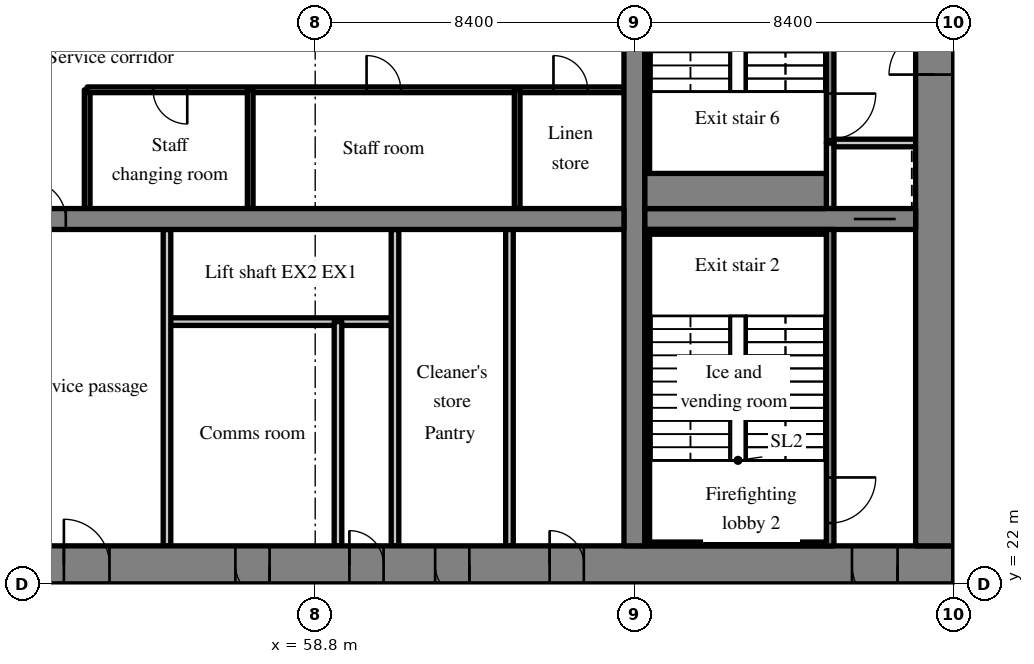
"""IFC4 building model, lengths in metres.
Left out: names, types, materials, properties, quantities, classifications, styles, units other than length and angle.
Written with IfcOpenShell. Run it as: python <this file> out.ifc"""

import sys

from ifc_helpers import new_model, si_unit, direction, frame, frame_2d, origin, place, context, subcontext, project, spatial, rectangle, extrude, source, transform, mapped, element, fill, save


model = new_model("IFC4")
c1 = context("Model", 3, precision=1e-05, world=origin(), true_north=direction((0.0, 1.0)))
c2 = subcontext(c1, "Body", "Model", "MODEL_VIEW")
j1 = project(units=[si_unit("LENGTHUNIT", "METRE"), si_unit("PLANEANGLEUNIT", "RADIAN")], contexts=[c1])
p1 = place(None, origin())
s1 = spatial("IfcSite", under=j1, at=p1, CompositionType="ELEMENT")
p2 = place(p1, origin())
s2 = spatial("IfcBuilding", under=s1, at=p2, CompositionType="ELEMENT")
p3 = place(p2, frame((0.0, 0.0, 65.8)))
s3 = spatial("IfcBuildingStorey", under=s2, at=p3, CompositionType="ELEMENT", Elevation=65.8)
m1 = source(origin(), c2, "Body", "SweptSolid", [
    extrude(rectangle(XDim=50.4, YDim=1.0, at=frame_2d((25.2, 0.0))), origin(), (0.0, 0.0, 1.0), 3.52),
])
p4 = place(p3, frame((25.2, 22.5, 0.0), z_axis=(0.0, 0.0, 1.0), x_axis=(1.0, 0.0, 0.0)))
e1 = element("IfcWall", 1, at=p4, inside=s3, PredefinedType="SHEAR", context=c2, shape_type="MappedRepresentation", body=[
    mapped(m1, transform((0.0, 0.0, 0.0), scale=1.0)),
])
m2 = source(origin(), c2, "Body", "SweptSolid", [
    extrude(rectangle(XDim=1.8, YDim=2.1, at=frame_2d((0.9, 1.05))), frame((0.0, 0.51, 0.0), z_axis=(0.0, -1.0, 0.0), x_axis=(1.0, 0.0, 0.0)), (0.0, 0.0, 1.0), 1.02),
])
p5 = place(p4, frame((15.9, 0.0, 0.0)))
e2 = element("IfcOpeningElement", 2, at=p5, cuts=e1, PredefinedType="OPENING", context=c2, shape_type="MappedRepresentation", body=[
    mapped(m2, transform((0.0, 0.0, 0.0), scale=1.0)),
])
m3 = source(origin(), c2, "Body", "SweptSolid", [
    extrude(rectangle(XDim=1.2, YDim=2.1, at=frame_2d((0.6, 1.05))), frame((0.0, 0.51, 0.0), z_axis=(0.0, -1.0, 0.0), x_axis=(1.0, 0.0, 0.0)), (0.0, 0.0, 1.0), 1.02),
])
p6 = place(p4, frame((26.987, 0.0, 0.0)))
e3 = element("IfcOpeningElement", 3, at=p6, cuts=e1, PredefinedType="OPENING", context=c2, shape_type="MappedRepresentation", body=[
    mapped(m3, transform((0.0, 0.0, 0.0), scale=1.0)),
])
m4 = source(origin(), c2, "Body", "SweptSolid", [
    extrude(rectangle(XDim=0.9, YDim=2.1, at=frame_2d((0.45, 1.05))), frame((0.0, 0.51, 0.0), z_axis=(0.0, -1.0, 0.0), x_axis=(1.0, 0.0, 0.0)), (0.0, 0.0, 1.0), 1.02),
])
p7 = place(p4, frame((34.5, 0.0, 0.0)))
e4 = element("IfcOpeningElement", 4, at=p7, cuts=e1, PredefinedType="OPENING", context=c2, shape_type="MappedRepresentation", body=[
    mapped(m4, transform((0.0, 0.0, 0.0), scale=1.0)),
])
p8 = place(p4, frame((31.5, 0.0, 0.0)))
e5 = element("IfcOpeningElement", 5, at=p8, cuts=e1, PredefinedType="OPENING", context=c2, shape_type="MappedRepresentation", body=[
    mapped(m4, transform((0.0, 0.0, 0.0), scale=1.0)),
])
p9 = place(p4, frame((39.769, 0.0, 0.0)))
e6 = element("IfcOpeningElement", 6, at=p9, cuts=e1, PredefinedType="OPENING", context=c2, shape_type="MappedRepresentation", body=[
    mapped(m4, transform((0.0, 0.0, 0.0), scale=1.0)),
])
p10 = place(p4, frame((36.756, 0.0, 0.0)))
e7 = element("IfcOpeningElement", 7, at=p10, cuts=e1, PredefinedType="OPENING", context=c2, shape_type="MappedRepresentation", body=[
    mapped(m4, transform((0.0, 0.0, 0.0), scale=1.0)),
])
p11 = place(p4, frame((6.438, 0.0, 0.0)))
e8 = element("IfcOpeningElement", 8, at=p11, cuts=e1, PredefinedType="OPENING", context=c2, shape_type="MappedRepresentation", body=[
    mapped(m3, transform((0.0, 0.0, 0.0), scale=1.0)),
])
p12 = place(p4, frame((47.725, 0.0, 0.0)))
e9 = element("IfcOpeningElement", 9, at=p12, cuts=e1, PredefinedType="OPENING", context=c2, shape_type="MappedRepresentation", body=[
    mapped(m3, transform((0.0, 0.0, 0.0), scale=1.0)),
])
m5 = source(origin(), c2, "Body", "SweptSolid", [
    extrude(rectangle(XDim=18.0, YDim=1.0, at=frame_2d((9.0, 0.0))), origin(), (0.0, 0.0, 1.0), 3.52),
])
p13 = place(p3, frame((75.1, 23.0, 0.0), z_axis=(0.0, 0.0, 1.0), x_axis=(0.0, 1.0, 0.0)))
e10 = element("IfcWall", 10, at=p13, inside=s3, PredefinedType="SHEAR", context=c2, shape_type="MappedRepresentation", body=[
    mapped(m5, transform((0.0, 0.0, 0.0), scale=1.0)),
])
p14 = place(p13, frame((12.4, 0.0, 0.0)))
e11 = element("IfcOpeningElement", 11, at=p14, cuts=e10, PredefinedType="OPENING", context=c2, shape_type="MappedRepresentation", body=[
    mapped(m3, transform((0.0, 0.0, 0.0), scale=1.0)),
])
m6 = source(origin(), c2, "Body", "SweptSolid", [
    extrude(rectangle(XDim=18.0, YDim=0.55, at=frame_2d((9.0, 0.0))), origin(), (0.0, 0.0, 1.0), 3.52),
])
p15 = place(p3, frame((67.2, 23.0, 0.0), z_axis=(0.0, 0.0, 1.0), x_axis=(0.0, 1.0, 0.0)))
e12 = element("IfcWall", 12, at=p15, inside=s3, PredefinedType="SHEAR", context=c2, shape_type="MappedRepresentation", body=[
    mapped(m6, transform((0.0, 0.0, 0.0), scale=1.0)),
])
m7 = source(origin(), c2, "Body", "SweptSolid", [
    extrude(rectangle(XDim=16.25, YDim=0.55, at=frame_2d((8.125, 0.0))), origin(), (0.0, 0.0, 1.0), 3.52),
])
p16 = place(p3, frame((50.675, 31.6, 0.0), z_axis=(0.0, 0.0, 1.0), x_axis=(1.0, 0.0, 0.0)))
e13 = element("IfcWall", 13, at=p16, inside=s3, PredefinedType="SHEAR", context=c2, shape_type="MappedRepresentation", body=[
    mapped(m7, transform((0.0, 0.0, 0.0), scale=1.0)),
])
m8 = source(origin(), c2, "Body", "SweptSolid", [
    extrude(rectangle(XDim=1.0, YDim=2.1, at=frame_2d((0.5, 1.05))), frame((0.0, 0.285, 0.0), z_axis=(0.0, -1.0, 0.0), x_axis=(1.0, 0.0, 0.0)), (0.0, 0.0, 1.0), 0.57),
])
p17 = place(p16, frame((0.562, 0.0, 0.0)))
e14 = element("IfcOpeningElement", 14, at=p17, cuts=e13, PredefinedType="OPENING", context=c2, shape_type="MappedRepresentation", body=[
    mapped(m8, transform((0.0, 0.0, 0.0), scale=1.0)),
])
m9 = source(origin(), c2, "Body", "SweptSolid", [
    extrude(rectangle(XDim=7.125, YDim=0.55, at=frame_2d((3.562, 0.0))), origin(), (0.0, 0.0, 1.0), 3.52),
])
p18 = place(p3, frame((67.475, 31.6, 0.0), z_axis=(0.0, 0.0, 1.0), x_axis=(1.0, 0.0, 0.0)))
e15 = element("IfcWall", 15, at=p18, inside=s3, PredefinedType="SHEAR", context=c2, shape_type="MappedRepresentation", body=[
    mapped(m9, transform((0.0, 0.0, 0.0), scale=1.0)),
])
m10 = source(origin(), c2, "Body", "SweptSolid", [
    extrude(rectangle(XDim=1.1, YDim=2.1, at=frame_2d((0.55, 1.05))), frame((0.0, 0.285, 0.0), z_axis=(0.0, -1.0, 0.0), x_axis=(1.0, 0.0, 0.0)), (0.0, 0.0, 1.0), 0.57),
])
p19 = place(p18, frame((5.5, 0.0, 0.0)))
e16 = element("IfcOpeningElement", 16, at=p19, cuts=e15, PredefinedType="OPENING", context=c2, shape_type="MappedRepresentation", body=[
    mapped(m10, transform((0.0, 0.0, 0.0), scale=1.0)),
])
m11 = source(origin(), c2, "Body", "SweptSolid", [
    extrude(rectangle(XDim=6.0, YDim=0.2, at=frame_2d((3.0, 0.0))), origin(), (0.0, 0.0, 1.0), 3.52),
])
p20 = place(p3, frame((60.9, 28.9, 0.0), z_axis=(0.0, 0.0, 1.0), x_axis=(-1.0, 0.0, 0.0)))
e17 = element("IfcWall", 17, at=p20, inside=s3, PredefinedType="SOLIDWALL", context=c2, shape_type="MappedRepresentation", body=[
    mapped(m11, transform((0.0, 0.0, 0.0), scale=1.0)),
])
m12 = source(origin(), c2, "Body", "SweptSolid", [
    extrude(rectangle(XDim=8.325, YDim=0.2, at=frame_2d((4.163, 0.0))), origin(), (0.0, 0.0, 1.0), 3.52),
])
for number, where, z_axis, x_axis in (
    (18, (54.9, 23.0, 0.0), (0.0, 0.0, 1.0), (0.0, 1.0, 0.0)),
    (19, (60.9, 23.0, 0.0), (0.0, 0.0, 1.0), (0.0, 1.0, 0.0)),
):
    element("IfcWall", number, at=place(p3, frame(where, z_axis=z_axis, x_axis=x_axis)), inside=s3, PredefinedType="PARTITIONING", context=c2, shape_type="MappedRepresentation", body=[
        mapped(m12, transform((0.0, 0.0, 0.0), scale=1.0)),
    ])
m13 = source(origin(), c2, "Body", "SweptSolid", [
    extrude(rectangle(XDim=5.9, YDim=0.2, at=frame_2d((2.95, 0.0))), origin(), (0.0, 0.0, 1.0), 3.52),
])
p21 = place(p3, frame((59.4, 23.0, 0.0), z_axis=(0.0, 0.0, 1.0), x_axis=(0.0, 1.0, 0.0)))
e20 = element("IfcWall", 20, at=p21, inside=s3, PredefinedType="PARTITIONING", context=c2, shape_type="MappedRepresentation", body=[
    mapped(m13, transform((0.0, 0.0, 0.0), scale=1.0)),
])
p22 = place(p3, frame((63.912, 23.0, 0.0), z_axis=(0.0, 0.0, 1.0), x_axis=(0.0, 1.0, 0.0)))
e21 = element("IfcWall", 21, at=p22, inside=s3, PredefinedType="PARTITIONING", context=c2, shape_type="MappedRepresentation", body=[
    mapped(m12, transform((0.0, 0.0, 0.0), scale=1.0)),
])
m14 = source(origin(), c2, "Body", "SweptSolid", [
    extrude(rectangle(XDim=3.125, YDim=0.15, at=frame_2d((1.562, 0.0))), origin(), (0.0, 0.0, 1.0), 3.52),
])
p23 = place(p3, frame((52.8, 31.875, 0.0), z_axis=(0.0, 0.0, 1.0), x_axis=(0.0, 1.0, 0.0)))
e22 = element("IfcWall", 22, at=p23, inside=s3, PredefinedType="PARTITIONING", context=c2, shape_type="MappedRepresentation", body=[
    mapped(m14, transform((0.0, 0.0, 0.0), scale=1.0)),
])
m15 = source(origin(), c2, "Body", "SweptSolid", [
    extrude(rectangle(XDim=14.125, YDim=0.15, at=frame_2d((7.062, 0.0))), origin(), (0.0, 0.0, 1.0), 3.52),
])
p24 = place(p3, frame((66.925, 35.0, 0.0), z_axis=(0.0, 0.0, 1.0), x_axis=(-1.0, 0.0, 0.0)))
e23 = element("IfcWall", 23, at=p24, inside=s3, PredefinedType="PARTITIONING", context=c2, shape_type="MappedRepresentation", body=[
    mapped(m15, transform((0.0, 0.0, 0.0), scale=1.0)),
])
m16 = source(origin(), c2, "Body", "SweptSolid", [
    extrude(rectangle(XDim=0.9, YDim=2.1, at=frame_2d((0.45, 1.05))), frame((0.0, 0.085, 0.0), z_axis=(0.0, -1.0, 0.0), x_axis=(1.0, 0.0, 0.0)), (0.0, 0.0, 1.0), 0.17),
])
p25 = place(p24, frame((0.955, 0.0, 0.0)))
e24 = element("IfcOpeningElement", 24, at=p25, cuts=e23, PredefinedType="OPENING", context=c2, shape_type="MappedRepresentation", body=[
    mapped(m16, transform((0.0, 0.0, 0.0), scale=1.0)),
])
p26 = place(p24, frame((5.873, 0.0, 0.0)))
e25 = element("IfcOpeningElement", 25, at=p26, cuts=e23, PredefinedType="OPENING", context=c2, shape_type="MappedRepresentation", body=[
    mapped(m16, transform((0.0, 0.0, 0.0), scale=1.0)),
])
p27 = place(p24, frame((11.492, 0.0, 0.0)))
e26 = element("IfcOpeningElement", 26, at=p27, cuts=e23, PredefinedType="OPENING", context=c2, shape_type="MappedRepresentation", body=[
    mapped(m16, transform((0.0, 0.0, 0.0), scale=1.0)),
])
for number, where, z_axis, x_axis in (
    (27, (64.115, 31.875, 0.0), (0.0, 0.0, 1.0), (0.0, 1.0, 0.0)),
    (28, (57.09, 31.875, 0.0), (0.0, 0.0, 1.0), (0.0, 1.0, 0.0)),
):
    element("IfcWall", number, at=place(p3, frame(where, z_axis=z_axis, x_axis=x_axis)), inside=s3, PredefinedType="PARTITIONING", context=c2, shape_type="MappedRepresentation", body=[
        mapped(m14, transform((0.0, 0.0, 0.0), scale=1.0)),
    ])
m17 = source(origin(), c2, "Body", "SweptSolid", [
    extrude(rectangle(XDim=8.325, YDim=0.2, at=frame_2d((4.163, 0.0))), origin(), (0.0, 0.0, 1.0), 3.52),
])
p28 = place(p3, frame((72.35, 23.0, 0.0), z_axis=(0.0, 0.0, 1.0), x_axis=(0.0, 1.0, 0.0)))
e29 = element("IfcWall", 29, at=p28, inside=s3, PredefinedType="SOLIDWALL", context=c2, shape_type="MappedRepresentation", body=[
    mapped(m17, transform((0.0, 0.0, 0.0), scale=1.0)),
])
m18 = source(origin(), c2, "Body", "SweptSolid", [
    extrude(rectangle(XDim=1.2, YDim=2.1, at=frame_2d((0.6, 1.05))), frame((0.0, 0.11, 0.0), z_axis=(0.0, -1.0, 0.0), x_axis=(1.0, 0.0, 0.0)), (0.0, 0.0, 1.0), 0.22),
])
p29 = place(p28, frame((0.6, 0.0, 0.0)))
e30 = element("IfcOpeningElement", 30, at=p29, cuts=e29, PredefinedType="OPENING", context=c2, shape_type="MappedRepresentation", body=[
    mapped(m18, transform((0.0, 0.0, 0.0), scale=1.0)),
])
m19 = source(origin(), c2, "Body", "SweptSolid", [
    extrude(rectangle(XDim=1.725, YDim=0.2, at=frame_2d((0.863, 0.0))), origin(), (0.0, 0.0, 1.0), 3.52),
])
p30 = place(p3, frame((72.35, 31.875, 0.0), z_axis=(0.0, 0.0, 1.0), x_axis=(0.0, 1.0, 0.0)))
e31 = element("IfcWall", 31, at=p30, inside=s3, PredefinedType="SOLIDWALL", context=c2, shape_type="MappedRepresentation", body=[
    mapped(m19, transform((0.0, 0.0, 0.0), scale=1.0)),
])
m20 = source(origin(), c2, "Body", "SweptSolid", [
    extrude(rectangle(XDim=2.15, YDim=0.2, at=frame_2d((1.075, 0.0))), origin(), (0.0, 0.0, 1.0), 3.52),
])
p31 = place(p3, frame((72.45, 33.6, 0.0), z_axis=(0.0, 0.0, 1.0), x_axis=(1.0, 0.0, 0.0)))
e32 = element("IfcWall", 32, at=p31, inside=s3, PredefinedType="SOLIDWALL", context=c2, shape_type="MappedRepresentation", body=[
    mapped(m20, transform((0.0, 0.0, 0.0), scale=1.0)),
])
m21 = source(origin(), c2, "Body", "SweptSolid", [
    extrude(rectangle(XDim=7.4, YDim=0.2, at=frame_2d((3.7, 0.0))), origin(), (0.0, 0.0, 1.0), 3.52),
])
p32 = place(p3, frame((72.35, 33.6, 0.0), z_axis=(0.0, 0.0, 1.0), x_axis=(0.0, 1.0, 0.0)))
e33 = element("IfcWall", 33, at=p32, inside=s3, PredefinedType="SOLIDWALL", context=c2, shape_type="MappedRepresentation", body=[
    mapped(m21, transform((0.0, 0.0, 0.0), scale=1.0)),
])
p33 = place(p32, frame((0.1, 0.0, 0.0)))
e34 = element("IfcOpeningElement", 34, at=p33, cuts=e33, PredefinedType="OPENING", context=c2, shape_type="MappedRepresentation", body=[
    mapped(m18, transform((0.0, 0.0, 0.0), scale=1.0)),
])
m22 = source(origin(), c2, "Body", "SweptSolid", [
    extrude(rectangle(XDim=8.2, YDim=0.2, at=frame_2d((4.1, 0.0))), origin(), (0.0, 0.0, 1.0), 3.52),
])
p34 = place(p3, frame((83.8, 22.1, 0.0), z_axis=(0.0, 0.0, 1.0), x_axis=(-1.0, 0.0, 0.0)))
e35 = element("IfcWall", 35, at=p34, inside=s3, PredefinedType="SOLIDWALL", context=c2, shape_type="MappedRepresentation", body=[
    mapped(m22, transform((0.0, 0.0, 0.0), scale=1.0)),
])
p35 = place(p34, frame((6.0, 0.0, 0.0)))
e36 = element("IfcOpeningElement", 36, at=p35, cuts=e35, PredefinedType="OPENING", context=c2, shape_type="MappedRepresentation", body=[
    mapped(m18, transform((0.0, 0.0, 0.0), scale=1.0)),
])
p36 = place(p3, frame((83.8, 30.4, 0.0), z_axis=(0.0, 0.0, 1.0), x_axis=(-1.0, 0.0, 0.0)))
e37 = element("IfcWall", 37, at=p36, inside=s3, PredefinedType="SOLIDWALL", context=c2, shape_type="MappedRepresentation", body=[
    mapped(m22, transform((0.0, 0.0, 0.0), scale=1.0)),
])
m23 = source(origin(), c2, "Body", "SweptSolid", [
    extrude(rectangle(XDim=1.0, YDim=2.1, at=frame_2d((0.5, 1.05))), frame((0.0, 0.11, 0.0), z_axis=(0.0, -1.0, 0.0), x_axis=(1.0, 0.0, 0.0)), (0.0, 0.0, 1.0), 0.22),
])
p37 = place(p36, frame((6.1, 0.0, 0.0)))
e38 = element("IfcOpeningElement", 38, at=p37, cuts=e37, PredefinedType="OPENING", context=c2, shape_type="MappedRepresentation", body=[
    mapped(m23, transform((0.0, 0.0, 0.0), scale=1.0)),
])
m24 = source(origin(), c2, "Body", "SweptSolid", [
    extrude(rectangle(XDim=4.775, YDim=0.1, at=frame_2d((2.387, 0.0))), origin(), (0.0, 0.0, 1.0), 3.52),
])
p38 = place(p3, frame((67.475, 23.05, 0.0), z_axis=(0.0, 0.0, 1.0), x_axis=(1.0, 0.0, 0.0)))
e39 = element("IfcWall", 39, at=p38, inside=s3, PredefinedType="SOLIDWALL", context=c2, shape_type="MappedRepresentation", body=[
    mapped(m24, transform((0.0, 0.0, 0.0), scale=1.0)),
])
m25 = source(origin(), c2, "Body", "SweptSolid", [
    extrude(rectangle(XDim=4.775, YDim=0.125, at=frame_2d((2.387, 0.0))), origin(), (0.0, 0.0, 1.0), 3.52),
])
p39 = place(p3, frame((67.475, 31.262, 0.0), z_axis=(0.0, 0.0, 1.0), x_axis=(1.0, 0.0, 0.0)))
e40 = element("IfcWall", 40, at=p39, inside=s3, PredefinedType="SOLIDWALL", context=c2, shape_type="MappedRepresentation", body=[
    mapped(m25, transform((0.0, 0.0, 0.0), scale=1.0)),
])
m26 = source(origin(), c2, "Body", "SweptSolid", [
    extrude(rectangle(XDim=8.1, YDim=0.125, at=frame_2d((4.05, 0.0))), origin(), (0.0, 0.0, 1.0), 3.52),
])
p40 = place(p3, frame((67.537, 23.1, 0.0), z_axis=(0.0, 0.0, 1.0), x_axis=(0.0, 1.0, 0.0)))
e41 = element("IfcWall", 41, at=p40, inside=s3, PredefinedType="SOLIDWALL", context=c2, shape_type="MappedRepresentation", body=[
    mapped(m26, transform((0.0, 0.0, 0.0), scale=1.0)),
])
m27 = source(origin(), c2, "Body", "SweptSolid", [
    extrude(rectangle(XDim=4.775, YDim=0.925, at=frame_2d((2.387, 0.0))), origin(), (0.0, 0.0, 1.0), 3.52),
])
p41 = place(p3, frame((67.475, 32.337, 0.0), z_axis=(0.0, 0.0, 1.0), x_axis=(1.0, 0.0, 0.0)))
e42 = element("IfcWall", 42, at=p41, inside=s3, PredefinedType="SOLIDWALL", context=c2, shape_type="MappedRepresentation", body=[
    mapped(m27, transform((0.0, 0.0, 0.0), scale=1.0)),
])
p42 = place(p3, frame((67.537, 32.8, 0.0), z_axis=(0.0, 0.0, 1.0), x_axis=(0.0, 1.0, 0.0)))
e43 = element("IfcWall", 43, at=p42, inside=s3, PredefinedType="SOLIDWALL", context=c2, shape_type="MappedRepresentation", body=[
    mapped(m26, transform((0.0, 0.0, 0.0), scale=1.0)),
])
m28 = source(origin(), c2, "Body", "SweptSolid", [
    extrude(rectangle(XDim=1.2, YDim=2.1, at=frame_2d((0.6, 1.05))), frame((0.0, 0.375, 0.0), z_axis=(0.0, -1.0, 0.0), x_axis=(1.0, 0.0, 0.0)), (0.0, 0.0, 1.0), 0.05),
])
p43 = place(p6, origin())
e44 = element("IfcDoor", 44, at=p43, inside=s3, OperationType="SINGLE_SWING_LEFT", PredefinedType="DOOR", context=c2, shape_type="MappedRepresentation", body=[
    mapped(m28, transform((0.0, 0.0, 0.0), scale=1.0)),
])
fill(e3, e44)
m29 = source(origin(), c2, "Body", "SweptSolid", [
    extrude(rectangle(XDim=1.0, YDim=2.1, at=frame_2d((0.5, 1.05))), frame((0.0, 0.025, 0.0), z_axis=(0.0, -1.0, 0.0), x_axis=(1.0, 0.0, 0.0)), (0.0, 0.0, 1.0), 0.05),
])
p44 = place(p17, origin())
e45 = element("IfcDoor", 45, at=p44, inside=s3, OperationType="SINGLE_SWING_LEFT", PredefinedType="DOOR", context=c2, shape_type="MappedRepresentation", body=[
    mapped(m29, transform((0.0, 0.0, 0.0), scale=1.0)),
])
fill(e14, e45)
m30 = source(origin(), c2, "Body", "SweptSolid", [
    extrude(rectangle(XDim=0.9, YDim=2.1, at=frame_2d((0.45, 1.05))), frame((0.0, 0.375, 0.0), z_axis=(0.0, -1.0, 0.0), x_axis=(1.0, 0.0, 0.0)), (0.0, 0.0, 1.0), 0.05),
])
p45 = place(p7, origin())
e46 = element("IfcDoor", 46, at=p45, inside=s3, OperationType="SINGLE_SWING_LEFT", PredefinedType="DOOR", context=c2, shape_type="MappedRepresentation", body=[
    mapped(m30, transform((0.0, 0.0, 0.0), scale=1.0)),
])
fill(e4, e46)
p46 = place(p8, origin())
e47 = element("IfcDoor", 47, at=p46, inside=s3, OperationType="SINGLE_SWING_RIGHT", PredefinedType="DOOR", context=c2, shape_type="MappedRepresentation", body=[
    mapped(m30, transform((0.0, 0.0, 0.0), scale=1.0)),
])
fill(e5, e47)
p47 = place(p9, origin())
e48 = element("IfcDoor", 48, at=p47, inside=s3, OperationType="SINGLE_SWING_LEFT", PredefinedType="DOOR", context=c2, shape_type="MappedRepresentation", body=[
    mapped(m30, transform((0.0, 0.0, 0.0), scale=1.0)),
])
fill(e6, e48)
p48 = place(p10, origin())
e49 = element("IfcDoor", 49, at=p48, inside=s3, OperationType="SINGLE_SWING_RIGHT", PredefinedType="DOOR", context=c2, shape_type="MappedRepresentation", body=[
    mapped(m30, transform((0.0, 0.0, 0.0), scale=1.0)),
])
fill(e7, e49)
m31 = source(origin(), c2, "Body", "SweptSolid", [
    extrude(rectangle(XDim=0.9, YDim=2.1, at=frame_2d((0.45, 1.05))), frame((0.0, 0.025, 0.0), z_axis=(0.0, -1.0, 0.0), x_axis=(1.0, 0.0, 0.0)), (0.0, 0.0, 1.0), 0.05),
])
p49 = place(p25, origin())
e50 = element("IfcDoor", 50, at=p49, inside=s3, OperationType="SINGLE_SWING_RIGHT", PredefinedType="DOOR", context=c2, shape_type="MappedRepresentation", body=[
    mapped(m31, transform((0.0, 0.0, 0.0), scale=1.0)),
])
fill(e24, e50)
p50 = place(p26, origin())
e51 = element("IfcDoor", 51, at=p50, inside=s3, OperationType="SINGLE_SWING_RIGHT", PredefinedType="DOOR", context=c2, shape_type="MappedRepresentation", body=[
    mapped(m31, transform((0.0, 0.0, 0.0), scale=1.0)),
])
fill(e25, e51)
p51 = place(p27, origin())
e52 = element("IfcDoor", 52, at=p51, inside=s3, OperationType="SINGLE_SWING_LEFT", PredefinedType="DOOR", context=c2, shape_type="MappedRepresentation", body=[
    mapped(m31, transform((0.0, 0.0, 0.0), scale=1.0)),
])
fill(e26, e52)
m32 = source(origin(), c2, "Body", "SweptSolid", [
    extrude(rectangle(XDim=1.2, YDim=2.1, at=frame_2d((0.6, 1.05))), frame((0.0, 0.025, 0.0), z_axis=(0.0, -1.0, 0.0), x_axis=(1.0, 0.0, 0.0)), (0.0, 0.0, 1.0), 0.05),
])
p52 = place(p29, origin())
e53 = element("IfcDoor", 53, at=p52, inside=s3, OperationType="SINGLE_SWING_RIGHT", PredefinedType="DOOR", context=c2, shape_type="MappedRepresentation", body=[
    mapped(m32, transform((0.0, 0.0, 0.0), scale=1.0)),
])
fill(e30, e53)
p53 = place(p12, origin())
e54 = element("IfcDoor", 54, at=p53, inside=s3, OperationType="SINGLE_SWING_RIGHT", PredefinedType="DOOR", context=c2, shape_type="MappedRepresentation", body=[
    mapped(m28, transform((0.0, 0.0, 0.0), scale=1.0)),
])
fill(e9, e54)
m33 = source(origin(), c2, "Body", "SweptSolid", [
    extrude(rectangle(XDim=1.1, YDim=2.1, at=frame_2d((0.55, 1.05))), frame((0.0, 0.025, 0.0), z_axis=(0.0, -1.0, 0.0), x_axis=(1.0, 0.0, 0.0)), (0.0, 0.0, 1.0), 0.05),
])
p54 = place(p19, origin())
e55 = element("IfcDoor", 55, at=p54, inside=s3, OperationType="SLIDING_TO_RIGHT", PredefinedType="DOOR", context=c2, shape_type="MappedRepresentation", body=[
    mapped(m33, transform((0.0, 0.0, 0.0), scale=1.0)),
])
fill(e16, e55)
p55 = place(p33, origin())
e56 = element("IfcDoor", 56, at=p55, inside=s3, OperationType="SINGLE_SWING_RIGHT", PredefinedType="DOOR", context=c2, shape_type="MappedRepresentation", body=[
    mapped(m32, transform((0.0, 0.0, 0.0), scale=1.0)),
])
fill(e34, e56)
p56 = place(p14, origin())
e57 = element("IfcDoor", 57, at=p56, inside=s3, OperationType="SINGLE_SWING_LEFT", PredefinedType="DOOR", context=c2, shape_type="MappedRepresentation", body=[
    mapped(m32, transform((0.0, 0.0, 0.0), scale=1.0)),
])
fill(e11, e57)
save(model, sys.argv[1])
